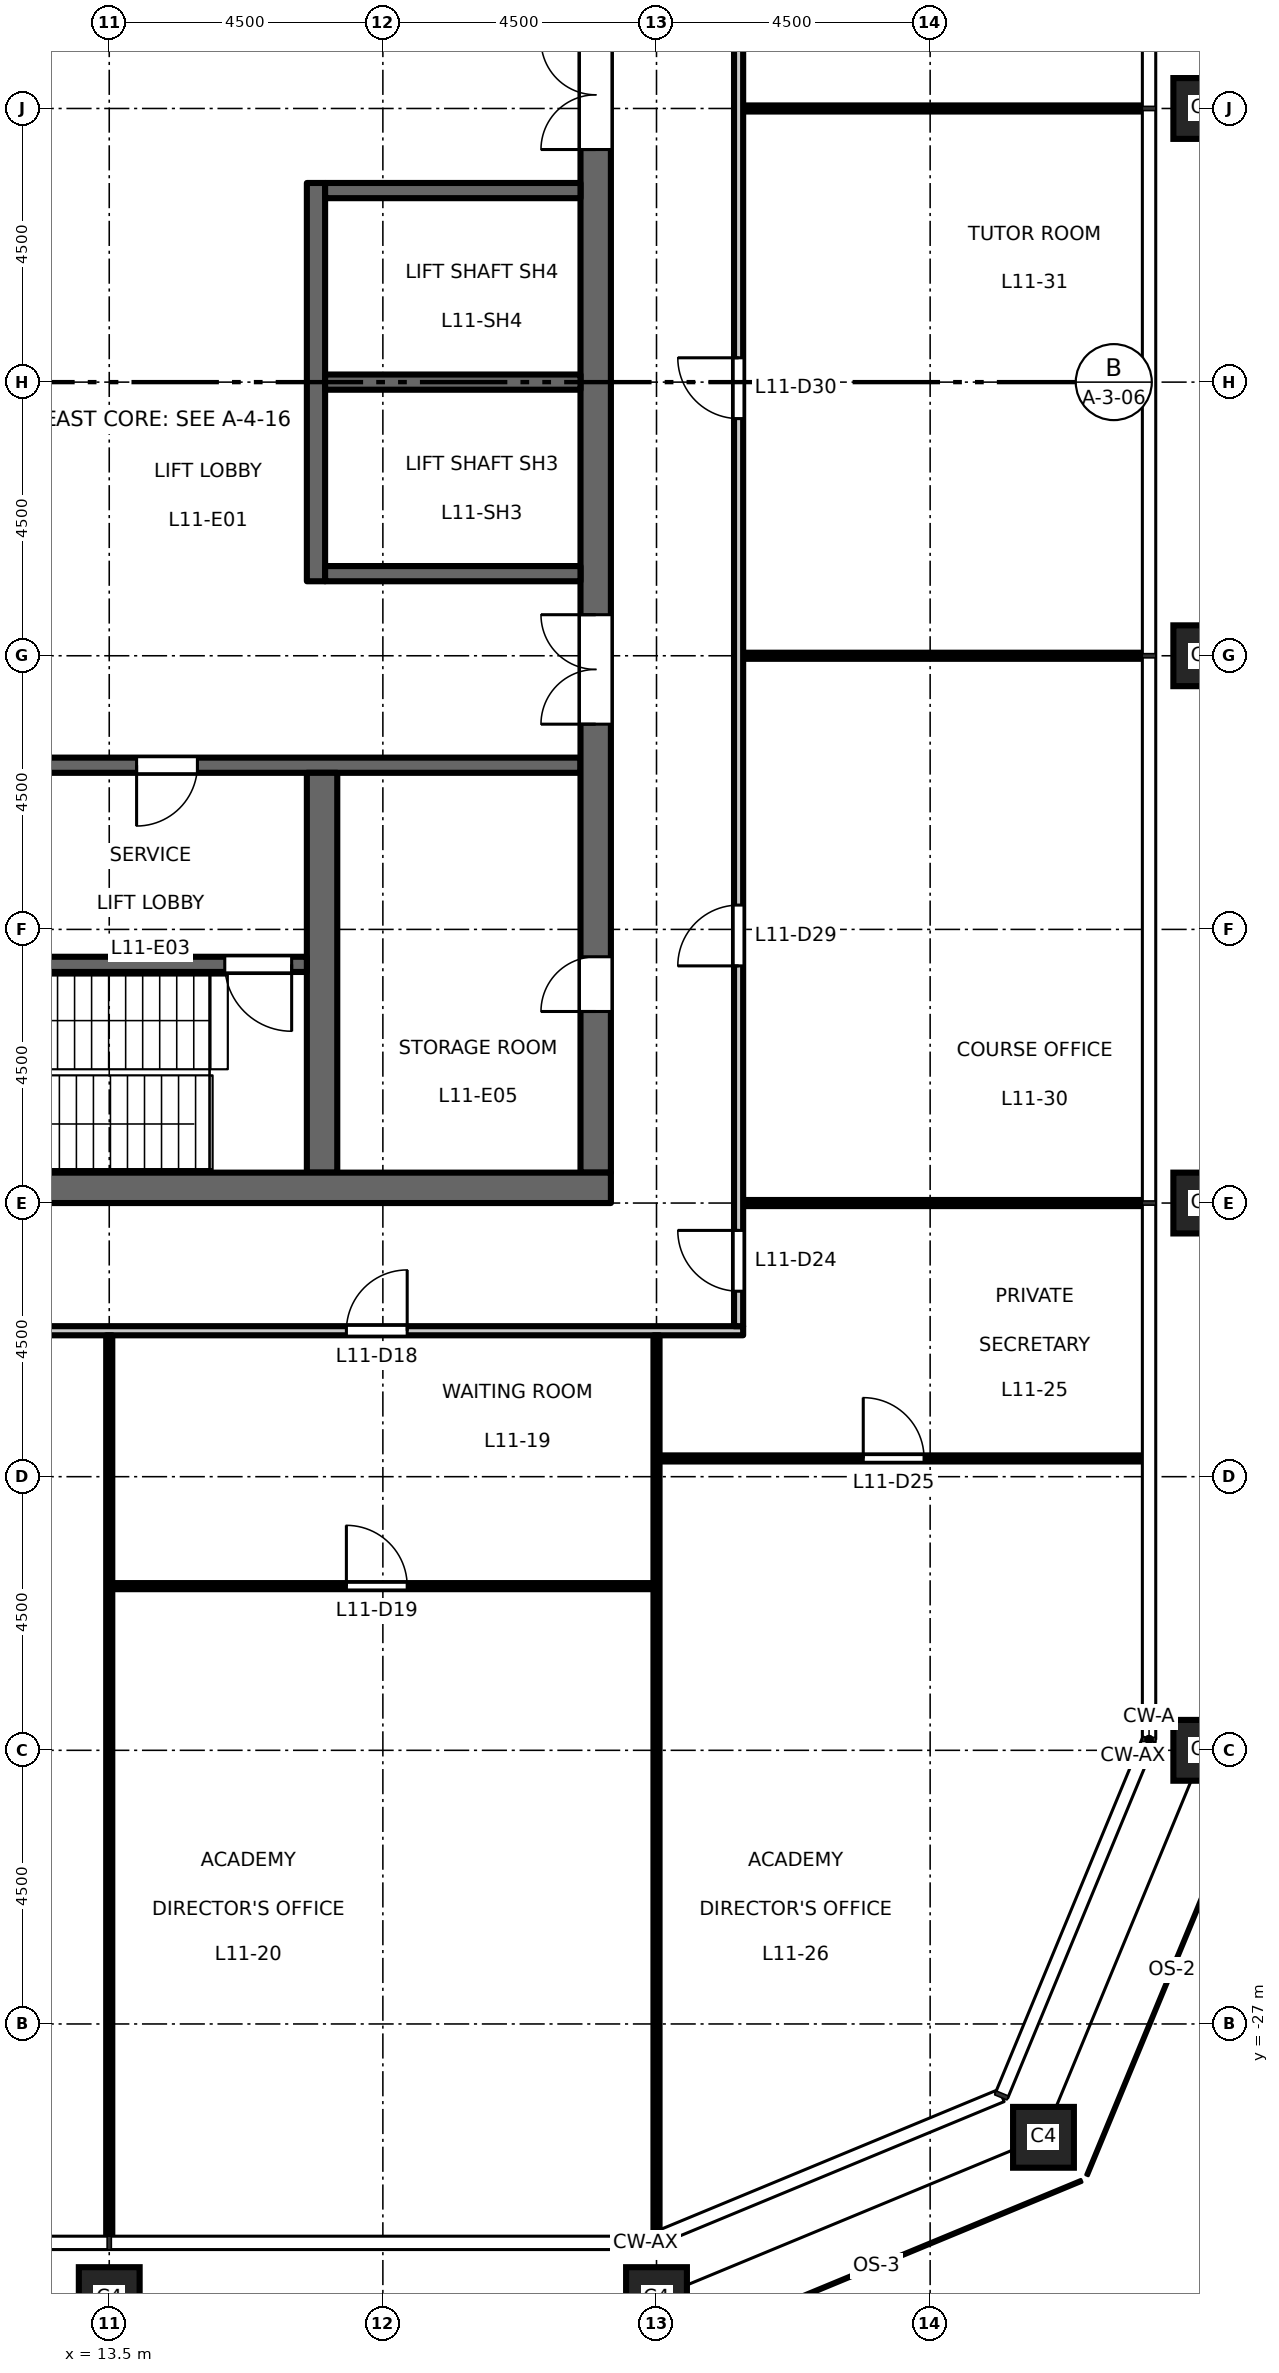
"""IFC4 building model, lengths in metres.
Left out: names, types, materials, properties, quantities, classifications, styles, units other than length and angle.
Written with IfcOpenShell. Run it as: python <this file> out.ifc"""

import sys

from ifc_helpers import new_model, si_unit, direction, frame, frame_2d, origin, origin_2d, place, context, subcontext, project, spatial, rectangle, hollow_rectangle, extrude, element, fill, save


model = new_model("IFC4")
c1 = context("Model", 3, precision=1e-05, world=origin(), true_north=direction((0.0, 1.0)))
c2 = subcontext(c1, "Body", "Model", "MODEL_VIEW")
j1 = project(units=[si_unit("LENGTHUNIT", "METRE"), si_unit("PLANEANGLEUNIT", "RADIAN")], contexts=[c1])
p1 = place(None, origin())
s1 = spatial("IfcSite", under=j1, at=p1, CompositionType="ELEMENT")
p2 = place(p1, origin())
s2 = spatial("IfcBuilding", under=s1, at=p2, CompositionType="ELEMENT")
p3 = place(p2, frame((0.0, 0.0, 53.7)))
s3 = spatial("IfcBuildingStorey", under=s2, at=p3, CompositionType="ELEMENT", Elevation=53.7)
for number, where, z_axis, x_axis in (
    (1, (13.5, -31.5, 0.0), (0.0, 0.0, 1.0), (1.0, 0.0, 0.0)),
    (2, (22.5, -31.5, 0.0), (0.0, 0.0, 1.0), (1.0, 0.0, 0.0)),
    (3, (28.864, -28.864, 0.0), (0.0, 0.0, 1.0), (1.0, 0.0, 0.0)),
    (4, (31.5, -22.5, 0.0), (0.0, 0.0, 1.0), (1.0, 0.0, 0.0)),
    (5, (31.5, -13.5, 0.0), (0.0, 0.0, 1.0), (1.0, 0.0, 0.0)),
    (6, (31.5, -4.5, 0.0), (0.0, 0.0, 1.0), (1.0, 0.0, 0.0)),
    (7, (31.5, 4.5, 0.0), (0.0, 0.0, 1.0), (1.0, 0.0, 0.0)),
):
    element("IfcColumn", number, at=place(p3, frame(where, z_axis=z_axis, x_axis=x_axis)), inside=s3, PredefinedType="COLUMN", context=c2, shape_type="SweptSolid", body=[
        extrude(hollow_rectangle(XDim=1.0, YDim=1.0, WallThickness=0.06, at=origin_2d()), origin(), (0.0, 0.0, 1.0), 4.5),
    ])
p4 = place(p3, frame((12.15, -6.3, 0.0), z_axis=(0.0, 0.0, 1.0), x_axis=(1.0, 0.0, 0.0)))
e8 = element("IfcWall", 8, at=p4, inside=s3, PredefinedType="SHEAR", context=c2, shape_type="SweptSolid", body=[
    extrude(rectangle(XDim=9.1, YDim=0.25, at=frame_2d((4.55, 0.0))), origin(), (0.0, 0.0, 1.0), 4.35),
])
p5 = place(p4, frame((1.8, 0.0, 0.0)))
e9 = element("IfcOpeningElement", 9, at=p5, cuts=e8, PredefinedType="OPENING", context=c2, shape_type="SweptSolid", body=[
    extrude(rectangle(XDim=1.0, YDim=2.1, at=frame_2d((0.5, 1.05))), frame((0.0, 0.135, 0.0), z_axis=(0.0, -1.0, 0.0), x_axis=(1.0, 0.0, 0.0)), (0.0, 0.0, 1.0), 0.27),
])
p6 = place(p3, frame((21.5, -13.0, 0.0), z_axis=(0.0, 0.0, 1.0), x_axis=(0.0, 1.0, 0.0)))
e10 = element("IfcWall", 10, at=p6, inside=s3, PredefinedType="SHEAR", context=c2, shape_type="SweptSolid", body=[
    extrude(rectangle(XDim=26.0, YDim=0.5, at=frame_2d((13.0, 0.0))), origin(), (0.0, 0.0, 1.0), 4.35),
])
p7 = place(p6, frame((16.825, 0.0, 0.0)))
e11 = element("IfcOpeningElement", 11, at=p7, cuts=e10, PredefinedType="OPENING", context=c2, shape_type="SweptSolid", body=[
    extrude(rectangle(XDim=1.8, YDim=2.1, at=frame_2d((0.9, 1.05))), frame((0.0, 0.26, 0.0), z_axis=(0.0, -1.0, 0.0), x_axis=(1.0, 0.0, 0.0)), (0.0, 0.0, 1.0), 0.52),
])
p8 = place(p6, frame((7.375, 0.0, 0.0)))
e12 = element("IfcOpeningElement", 12, at=p8, cuts=e10, PredefinedType="OPENING", context=c2, shape_type="SweptSolid", body=[
    extrude(rectangle(XDim=1.8, YDim=2.1, at=frame_2d((0.9, 1.05))), frame((0.0, 0.26, 0.0), z_axis=(0.0, -1.0, 0.0), x_axis=(1.0, 0.0, 0.0)), (0.0, 0.0, 1.0), 0.52),
])
p9 = place(p6, frame((2.65, 0.0, 0.0)))
e13 = element("IfcOpeningElement", 13, at=p9, cuts=e10, PredefinedType="OPENING", context=c2, shape_type="SweptSolid", body=[
    extrude(rectangle(XDim=0.9, YDim=2.1, at=frame_2d((0.45, 1.05))), frame((0.0, 0.26, 0.0), z_axis=(0.0, -1.0, 0.0), x_axis=(1.0, 0.0, 0.0)), (0.0, 0.0, 1.0), 0.52),
])
p10 = place(p3, frame((16.9, -3.275, 0.0), z_axis=(0.0, 0.0, 1.0), x_axis=(0.0, 1.0, 0.0)))
e14 = element("IfcWall", 14, at=p10, inside=s3, PredefinedType="SHEAR", context=c2, shape_type="SweptSolid", body=[
    extrude(rectangle(XDim=6.55, YDim=0.3, at=frame_2d((3.275, 0.0))), origin(), (0.0, 0.0, 1.0), 4.35),
])
for number, where, z_axis, x_axis in (
    (15, (17.05, 0.0, 0.0), (0.0, 0.0, 1.0), (1.0, 0.0, 0.0)),
    (16, (17.05, 3.15, 0.0), (0.0, 0.0, 1.0), (1.0, 0.0, 0.0)),
    (17, (17.05, -3.15, 0.0), (0.0, 0.0, 1.0), (1.0, 0.0, 0.0)),
):
    element("IfcWall", number, at=place(p3, frame(where, z_axis=z_axis, x_axis=x_axis)), inside=s3, PredefinedType="SHEAR", context=c2, shape_type="SweptSolid", body=[
        extrude(rectangle(XDim=4.2, YDim=0.25, at=frame_2d((2.1, 0.0))), origin(), (0.0, 0.0, 1.0), 4.35),
    ])
p11 = place(p3, frame((17.0, -13.0, 0.0), z_axis=(0.0, 0.0, 1.0), x_axis=(0.0, 1.0, 0.0)))
e18 = element("IfcWall", 18, at=p11, inside=s3, PredefinedType="SHEAR", context=c2, shape_type="SweptSolid", body=[
    extrude(rectangle(XDim=6.575, YDim=0.5, at=frame_2d((3.288, 0.0))), origin(), (0.0, 0.0, 1.0), 4.35),
])
p12 = place(p3, frame((8.75, -9.575, 0.0), z_axis=(0.0, 0.0, 1.0), x_axis=(1.0, 0.0, 0.0)))
e19 = element("IfcWall", 19, at=p12, inside=s3, PredefinedType="SHEAR", context=c2, shape_type="SweptSolid", body=[
    extrude(rectangle(XDim=8.0, YDim=0.25, at=frame_2d((4.0, 0.0))), origin(), (0.0, 0.0, 1.0), 4.35),
])
p13 = place(p12, frame((6.65, 0.0, 0.0)))
e20 = element("IfcOpeningElement", 20, at=p13, cuts=e19, PredefinedType="OPENING", context=c2, shape_type="SweptSolid", body=[
    extrude(rectangle(XDim=1.1, YDim=2.1, at=frame_2d((0.55, 1.05))), frame((0.0, 0.135, 0.0), z_axis=(0.0, -1.0, 0.0), x_axis=(1.0, 0.0, 0.0)), (0.0, 0.0, 1.0), 0.27),
])
p14 = place(p3, frame((8.25, -13.25, 0.0), z_axis=(0.0, 0.0, 1.0), x_axis=(1.0, 0.0, 0.0)))
e21 = element("IfcWall", 21, at=p14, inside=s3, PredefinedType="SHEAR", context=c2, shape_type="SweptSolid", body=[
    extrude(rectangle(XDim=13.5, YDim=0.5, at=frame_2d((6.75, 0.0))), origin(), (0.0, 0.0, 1.0), 4.35),
])
p15 = place(p3, frame((13.55, -19.8, 0.0), z_axis=(0.0, 0.0, 1.0), x_axis=(1.0, 0.0, 0.0)))
e22 = element("IfcWall", 22, at=p15, inside=s3, PredefinedType="PARTITIONING", context=c2, shape_type="SweptSolid", body=[
    extrude(rectangle(XDim=8.9, YDim=0.1, at=frame_2d((4.45, 0.0))), origin(), (0.0, 0.0, 1.0), 4.35),
])
p16 = place(p15, frame((3.85, 0.0, 0.0)))
e23 = element("IfcOpeningElement", 23, at=p16, cuts=e22, PredefinedType="OPENING", context=c2, shape_type="SweptSolid", body=[
    extrude(rectangle(XDim=1.0, YDim=2.1, at=frame_2d((0.5, 1.05))), frame((0.0, 0.06, 0.0), z_axis=(0.0, -1.0, 0.0), x_axis=(1.0, 0.0, 0.0)), (0.0, 0.0, 1.0), 0.12),
])
p17 = place(p3, frame((22.55, -17.7, 0.0), z_axis=(0.0, 0.0, 1.0), x_axis=(1.0, 0.0, 0.0)))
e24 = element("IfcWall", 24, at=p17, inside=s3, PredefinedType="PARTITIONING", context=c2, shape_type="SweptSolid", body=[
    extrude(rectangle(XDim=7.96, YDim=0.1, at=frame_2d((3.98, 0.0))), origin(), (0.0, 0.0, 1.0), 4.35),
])
p18 = place(p17, frame((3.35, 0.0, 0.0)))
e25 = element("IfcOpeningElement", 25, at=p18, cuts=e24, PredefinedType="OPENING", context=c2, shape_type="SweptSolid", body=[
    extrude(rectangle(XDim=1.0, YDim=2.1, at=frame_2d((0.5, 1.05))), frame((0.0, 0.06, 0.0), z_axis=(0.0, -1.0, 0.0), x_axis=(1.0, 0.0, 0.0)), (0.0, 0.0, 1.0), 0.12),
])
p19 = place(p3, frame((-23.925, -15.6, 0.0), z_axis=(0.0, 0.0, 1.0), x_axis=(1.0, 0.0, 0.0)))
e26 = element("IfcWall", 26, at=p19, inside=s3, PredefinedType="PARTITIONING", context=c2, shape_type="SweptSolid", body=[
    extrude(rectangle(XDim=47.85, YDim=0.15, at=frame_2d((23.925, 0.0))), origin(), (0.0, 0.0, 1.0), 4.35),
])
p20 = place(p19, frame((5.325, 0.0, 0.0)))
e27 = element("IfcOpeningElement", 27, at=p20, cuts=e26, PredefinedType="OPENING", context=c2, shape_type="SweptSolid", body=[
    extrude(rectangle(XDim=1.0, YDim=2.1, at=frame_2d((0.5, 1.05))), frame((0.0, 0.085, 0.0), z_axis=(0.0, -1.0, 0.0), x_axis=(1.0, 0.0, 0.0)), (0.0, 0.0, 1.0), 0.17),
])
p21 = place(p19, frame((14.325, 0.0, 0.0)))
e28 = element("IfcOpeningElement", 28, at=p21, cuts=e26, PredefinedType="OPENING", context=c2, shape_type="SweptSolid", body=[
    extrude(rectangle(XDim=1.0, YDim=2.1, at=frame_2d((0.5, 1.05))), frame((0.0, 0.085, 0.0), z_axis=(0.0, -1.0, 0.0), x_axis=(1.0, 0.0, 0.0)), (0.0, 0.0, 1.0), 0.17),
])
p22 = place(p19, frame((23.325, 0.0, 0.0)))
e29 = element("IfcOpeningElement", 29, at=p22, cuts=e26, PredefinedType="OPENING", context=c2, shape_type="SweptSolid", body=[
    extrude(rectangle(XDim=1.0, YDim=2.1, at=frame_2d((0.5, 1.05))), frame((0.0, 0.085, 0.0), z_axis=(0.0, -1.0, 0.0), x_axis=(1.0, 0.0, 0.0)), (0.0, 0.0, 1.0), 0.17),
])
p23 = place(p19, frame((32.325, 0.0, 0.0)))
e30 = element("IfcOpeningElement", 30, at=p23, cuts=e26, PredefinedType="OPENING", context=c2, shape_type="SweptSolid", body=[
    extrude(rectangle(XDim=1.0, YDim=2.1, at=frame_2d((0.5, 1.05))), frame((0.0, 0.085, 0.0), z_axis=(0.0, -1.0, 0.0), x_axis=(1.0, 0.0, 0.0)), (0.0, 0.0, 1.0), 0.17),
])
p24 = place(p19, frame((41.325, 0.0, 0.0)))
e31 = element("IfcOpeningElement", 31, at=p24, cuts=e26, PredefinedType="OPENING", context=c2, shape_type="SweptSolid", body=[
    extrude(rectangle(XDim=1.0, YDim=2.1, at=frame_2d((0.5, 1.05))), frame((0.0, 0.085, 0.0), z_axis=(0.0, -1.0, 0.0), x_axis=(1.0, 0.0, 0.0)), (0.0, 0.0, 1.0), 0.17),
])
p25 = place(p3, frame((23.925, -13.5, 0.0), z_axis=(0.0, 0.0, 1.0), x_axis=(1.0, 0.0, 0.0)))
e32 = element("IfcWall", 32, at=p25, inside=s3, PredefinedType="PARTITIONING", context=c2, shape_type="SweptSolid", body=[
    extrude(rectangle(XDim=6.585, YDim=0.1, at=frame_2d((3.292, 0.0))), origin(), (0.0, 0.0, 1.0), 3.35),
])
for number, where, z_axis, x_axis in (
    (33, (23.925, -4.5, 0.0), (0.0, 0.0, 1.0), (1.0, 0.0, 0.0)),
    (34, (23.925, 4.5, 0.0), (0.0, 0.0, 1.0), (1.0, 0.0, 0.0)),
):
    element("IfcWall", number, at=place(p3, frame(where, z_axis=z_axis, x_axis=x_axis)), inside=s3, PredefinedType="PARTITIONING", context=c2, shape_type="SweptSolid", body=[
        extrude(rectangle(XDim=6.585, YDim=0.1, at=frame_2d((3.292, 0.0))), origin(), (0.0, 0.0, 1.0), 4.35),
    ])
p26 = place(p3, frame((13.5, -30.51, 0.0), z_axis=(0.0, 0.0, 1.0), x_axis=(0.0, 1.0, 0.0)))
e35 = element("IfcWall", 35, at=p26, inside=s3, PredefinedType="PARTITIONING", context=c2, shape_type="SweptSolid", body=[
    extrude(rectangle(XDim=14.835, YDim=0.1, at=frame_2d((7.417, 0.0))), origin(), (0.0, 0.0, 1.0), 3.35),
])
p27 = place(p3, frame((22.5, -30.428, 0.0), z_axis=(0.0, 0.0, 1.0), x_axis=(0.0, 1.0, 0.0)))
e36 = element("IfcWall", 36, at=p27, inside=s3, PredefinedType="PARTITIONING", context=c2, shape_type="SweptSolid", body=[
    extrude(rectangle(XDim=14.753, YDim=0.1, at=frame_2d((7.376, 0.0))), origin(), (0.0, 0.0, 1.0), 3.35),
])
p28 = place(p3, frame((23.85, -15.525, 0.0), z_axis=(0.0, 0.0, 1.0), x_axis=(0.0, 1.0, 0.0)))
e37 = element("IfcWall", 37, at=p28, inside=s3, PredefinedType="PARTITIONING", context=c2, shape_type="SweptSolid", body=[
    extrude(rectangle(XDim=31.05, YDim=0.15, at=frame_2d((15.525, 0.0))), origin(), (0.0, 0.0, 1.0), 4.35),
])
p29 = place(p28, frame((29.675, 0.0, 0.0)))
e38 = element("IfcOpeningElement", 38, at=p29, cuts=e37, PredefinedType="OPENING", context=c2, shape_type="SweptSolid", body=[
    extrude(rectangle(XDim=1.0, YDim=2.1, at=frame_2d((0.5, 1.05))), frame((0.0, 0.085, 0.0), z_axis=(0.0, -1.0, 0.0), x_axis=(1.0, 0.0, 0.0)), (0.0, 0.0, 1.0), 0.17),
])
p30 = place(p28, frame((0.575, 0.0, 0.0)))
e39 = element("IfcOpeningElement", 39, at=p30, cuts=e37, PredefinedType="OPENING", context=c2, shape_type="SweptSolid", body=[
    extrude(rectangle(XDim=1.0, YDim=2.1, at=frame_2d((0.5, 1.05))), frame((0.0, 0.085, 0.0), z_axis=(0.0, -1.0, 0.0), x_axis=(1.0, 0.0, 0.0)), (0.0, 0.0, 1.0), 0.17),
])
p31 = place(p28, frame((5.925, 0.0, 0.0)))
e40 = element("IfcOpeningElement", 40, at=p31, cuts=e37, PredefinedType="OPENING", context=c2, shape_type="SweptSolid", body=[
    extrude(rectangle(XDim=1.0, YDim=2.1, at=frame_2d((0.5, 1.05))), frame((0.0, 0.085, 0.0), z_axis=(0.0, -1.0, 0.0), x_axis=(1.0, 0.0, 0.0)), (0.0, 0.0, 1.0), 0.17),
])
p32 = place(p28, frame((14.925, 0.0, 0.0)))
e41 = element("IfcOpeningElement", 41, at=p32, cuts=e37, PredefinedType="OPENING", context=c2, shape_type="SweptSolid", body=[
    extrude(rectangle(XDim=1.0, YDim=2.1, at=frame_2d((0.5, 1.05))), frame((0.0, 0.085, 0.0), z_axis=(0.0, -1.0, 0.0), x_axis=(1.0, 0.0, 0.0)), (0.0, 0.0, 1.0), 0.17),
])
p33 = place(p28, frame((23.925, 0.0, 0.0)))
e42 = element("IfcOpeningElement", 42, at=p33, cuts=e37, PredefinedType="OPENING", context=c2, shape_type="SweptSolid", body=[
    extrude(rectangle(XDim=1.0, YDim=2.1, at=frame_2d((0.5, 1.05))), frame((0.0, 0.085, 0.0), z_axis=(0.0, -1.0, 0.0), x_axis=(1.0, 0.0, 0.0)), (0.0, 0.0, 1.0), 0.17),
])
p34 = place(p5, origin())
e43 = element("IfcDoor", 43, at=p34, inside=s3, OperationType="SINGLE_SWING_LEFT", PredefinedType="DOOR", context=c2, shape_type="SweptSolid", body=[
    extrude(rectangle(XDim=1.0, YDim=2.1, at=frame_2d((0.5, 1.05))), frame((0.0, 0.025, 0.0), z_axis=(0.0, -1.0, 0.0), x_axis=(1.0, 0.0, 0.0)), (0.0, 0.0, 1.0), 0.05),
])
fill(e9, e43)
p35 = place(p13, origin())
e44 = element("IfcDoor", 44, at=p35, inside=s3, OperationType="SINGLE_SWING_RIGHT", PredefinedType="DOOR", context=c2, shape_type="SweptSolid", body=[
    extrude(rectangle(XDim=1.1, YDim=2.1, at=frame_2d((0.55, 1.05))), frame((0.0, 0.025, 0.0), z_axis=(0.0, -1.0, 0.0), x_axis=(1.0, 0.0, 0.0)), (0.0, 0.0, 1.0), 0.05),
])
fill(e20, e44)
p36 = place(p7, origin())
e45 = element("IfcDoor", 45, at=p36, inside=s3, OperationType="DOUBLE_DOOR_DOUBLE_SWING", PredefinedType="DOOR", context=c2, shape_type="SweptSolid", body=[
    extrude(rectangle(XDim=1.8, YDim=2.1, at=frame_2d((0.9, 1.05))), frame((0.0, 0.025, 0.0), z_axis=(0.0, -1.0, 0.0), x_axis=(1.0, 0.0, 0.0)), (0.0, 0.0, 1.0), 0.05),
])
fill(e11, e45)
p37 = place(p8, origin())
e46 = element("IfcDoor", 46, at=p37, inside=s3, OperationType="DOUBLE_DOOR_DOUBLE_SWING", PredefinedType="DOOR", context=c2, shape_type="SweptSolid", body=[
    extrude(rectangle(XDim=1.8, YDim=2.1, at=frame_2d((0.9, 1.05))), frame((0.0, 0.025, 0.0), z_axis=(0.0, -1.0, 0.0), x_axis=(1.0, 0.0, 0.0)), (0.0, 0.0, 1.0), 0.05),
])
fill(e12, e46)
p38 = place(p9, origin())
e47 = element("IfcDoor", 47, at=p38, inside=s3, OperationType="SINGLE_SWING_RIGHT", PredefinedType="DOOR", context=c2, shape_type="SweptSolid", body=[
    extrude(rectangle(XDim=0.9, YDim=2.1, at=frame_2d((0.45, 1.05))), frame((0.0, 0.025, 0.0), z_axis=(0.0, -1.0, 0.0), x_axis=(1.0, 0.0, 0.0)), (0.0, 0.0, 1.0), 0.05),
])
fill(e13, e47)
p39 = place(p24, origin())
e48 = element("IfcDoor", 48, at=p39, inside=s3, OperationType="SINGLE_SWING_RIGHT", PredefinedType="DOOR", context=c2, shape_type="SweptSolid", body=[
    extrude(rectangle(XDim=1.0, YDim=2.1, at=frame_2d((0.5, 1.05))), frame((0.0, 0.025, 0.0), z_axis=(0.0, -1.0, 0.0), x_axis=(1.0, 0.0, 0.0)), (0.0, 0.0, 1.0), 0.05),
])
fill(e31, e48)
p40 = place(p16, origin())
e49 = element("IfcDoor", 49, at=p40, inside=s3, OperationType="SINGLE_SWING_LEFT", PredefinedType="DOOR", context=c2, shape_type="SweptSolid", body=[
    extrude(rectangle(XDim=1.0, YDim=2.1, at=frame_2d((0.5, 1.05))), frame((0.0, 0.025, 0.0), z_axis=(0.0, -1.0, 0.0), x_axis=(1.0, 0.0, 0.0)), (0.0, 0.0, 1.0), 0.05),
])
fill(e23, e49)
p41 = place(p30, origin())
e50 = element("IfcDoor", 50, at=p41, inside=s3, OperationType="SINGLE_SWING_RIGHT", PredefinedType="DOOR", context=c2, shape_type="SweptSolid", body=[
    extrude(rectangle(XDim=1.0, YDim=2.1, at=frame_2d((0.5, 1.05))), frame((0.0, 0.025, 0.0), z_axis=(0.0, -1.0, 0.0), x_axis=(1.0, 0.0, 0.0)), (0.0, 0.0, 1.0), 0.05),
])
fill(e39, e50)
p42 = place(p18, origin())
e51 = element("IfcDoor", 51, at=p42, inside=s3, OperationType="SINGLE_SWING_LEFT", PredefinedType="DOOR", context=c2, shape_type="SweptSolid", body=[
    extrude(rectangle(XDim=1.0, YDim=2.1, at=frame_2d((0.5, 1.05))), frame((0.0, 0.025, 0.0), z_axis=(0.0, -1.0, 0.0), x_axis=(1.0, 0.0, 0.0)), (0.0, 0.0, 1.0), 0.05),
])
fill(e25, e51)
p43 = place(p31, origin())
e52 = element("IfcDoor", 52, at=p43, inside=s3, OperationType="SINGLE_SWING_LEFT", PredefinedType="DOOR", context=c2, shape_type="SweptSolid", body=[
    extrude(rectangle(XDim=1.0, YDim=2.1, at=frame_2d((0.5, 1.05))), frame((0.0, 0.025, 0.0), z_axis=(0.0, -1.0, 0.0), x_axis=(1.0, 0.0, 0.0)), (0.0, 0.0, 1.0), 0.05),
])
fill(e40, e52)
p44 = place(p32, origin())
e53 = element("IfcDoor", 53, at=p44, inside=s3, OperationType="SINGLE_SWING_RIGHT", PredefinedType="DOOR", context=c2, shape_type="SweptSolid", body=[
    extrude(rectangle(XDim=1.0, YDim=2.1, at=frame_2d((0.5, 1.05))), frame((0.0, 0.025, 0.0), z_axis=(0.0, -1.0, 0.0), x_axis=(1.0, 0.0, 0.0)), (0.0, 0.0, 1.0), 0.05),
])
fill(e41, e53)
save(model, sys.argv[1])
